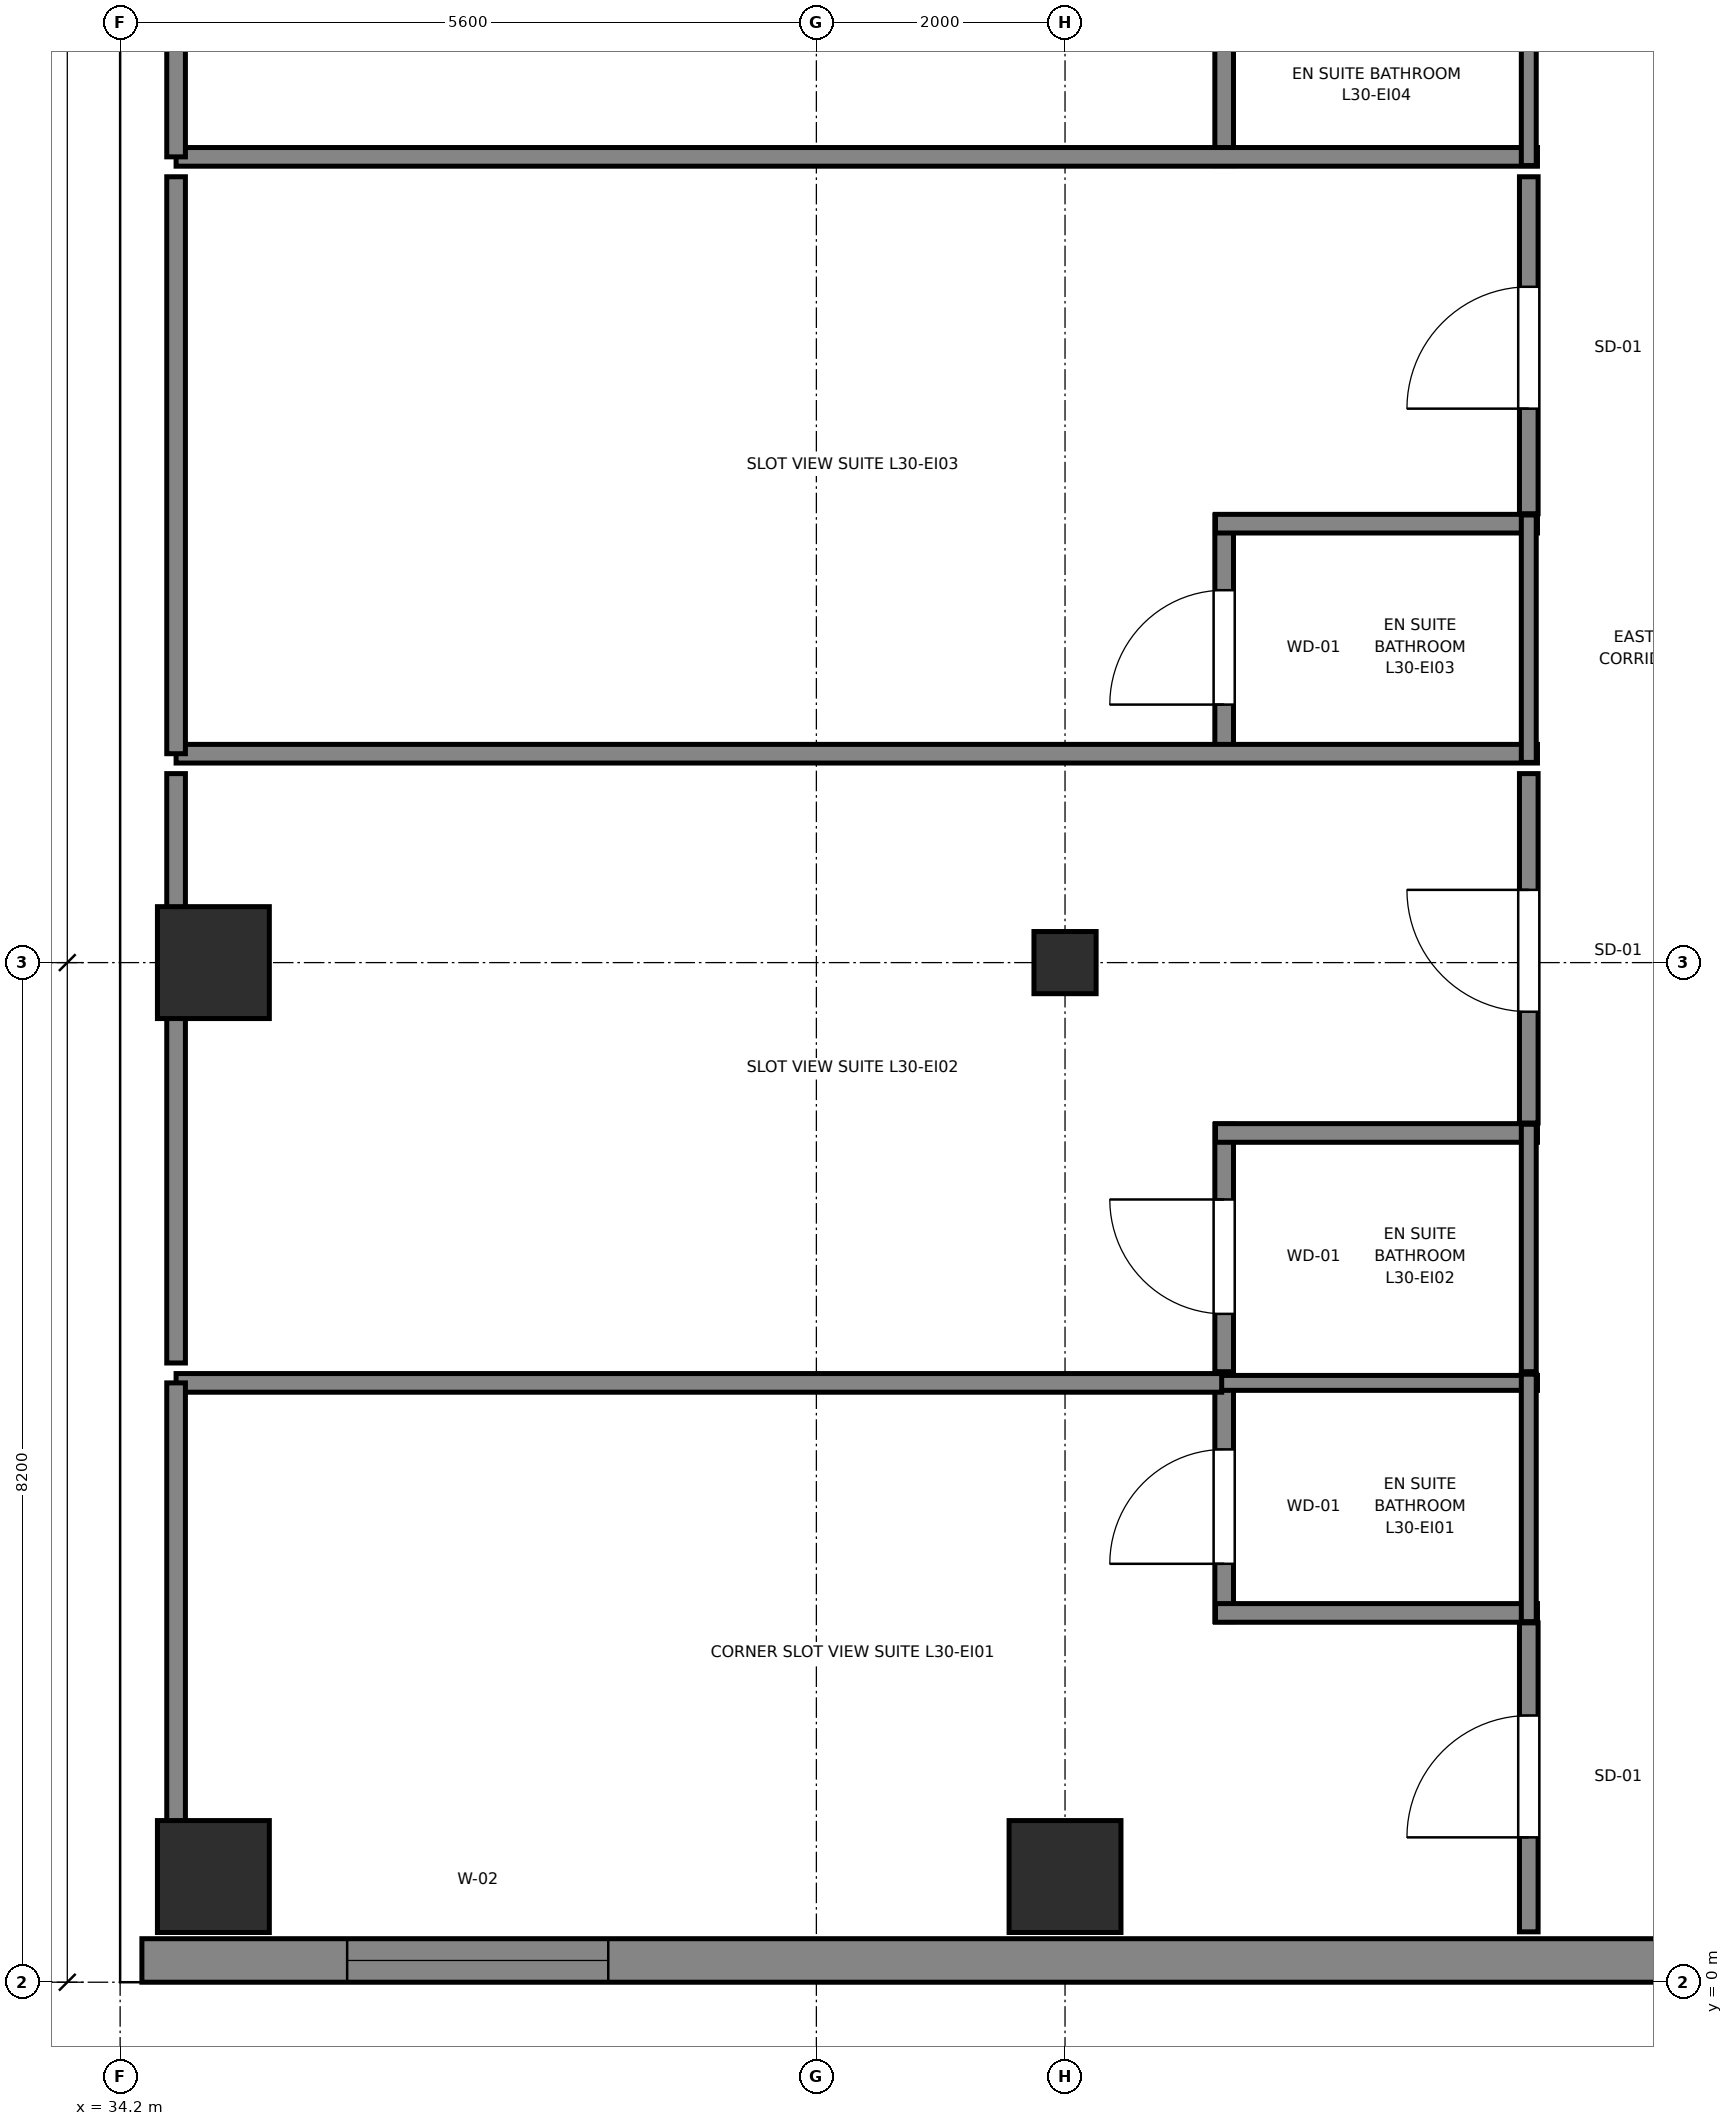
"""IFC4 building model, lengths in metres.
Left out: names, types, materials, properties, quantities, classifications, styles, units other than length and angle.
Written with IfcOpenShell. Run it as: python <this file> out.ifc"""

import sys

from ifc_helpers import new_model, si_unit, direction, frame, frame_2d, origin, origin_2d, place, context, subcontext, project, spatial, rectangle, i_section, extrude, source, transform, mapped, element, fill, save


model = new_model("IFC4")
c1 = context("Model", 3, precision=1e-05, world=origin(), true_north=direction((0.0, 1.0)))
c2 = subcontext(c1, "Body", "Model", "MODEL_VIEW")
j1 = project(units=[si_unit("LENGTHUNIT", "METRE"), si_unit("PLANEANGLEUNIT", "RADIAN")], contexts=[c1])
p1 = place(None, origin())
s1 = spatial("IfcSite", under=j1, at=p1, CompositionType="ELEMENT")
p2 = place(p1, origin())
s2 = spatial("IfcBuilding", under=s1, at=p2, CompositionType="ELEMENT")
p3 = place(p2, frame((0.0, 0.0, 118.65)))
s3 = spatial("IfcBuildingStorey", under=s2, at=p3, CompositionType="ELEMENT", Elevation=118.65)
m1 = source(origin(), c2, "Body", "SweptSolid", [
    extrude(rectangle(XDim=0.9, YDim=0.9, at=origin_2d()), origin(), (0.0, 0.0, 1.0), 3.55),
])
for number, where, z_axis, x_axis in (
    (1, (34.95, 0.85, 0.0), (0.0, 0.0, 1.0), (1.0, 0.0, 0.0)),
    (2, (34.95, 8.2, 0.0), (0.0, 0.0, 1.0), (1.0, 0.0, 0.0)),
    (3, (41.8, 0.85, 0.0), (0.0, 0.0, 1.0), (1.0, 0.0, 0.0)),
):
    element("IfcColumn", number, at=place(p3, frame(where, z_axis=z_axis, x_axis=x_axis)), inside=s3, PredefinedType="COLUMN", context=c2, shape_type="MappedRepresentation", body=[
        mapped(m1, transform((0.0, 0.0, 0.0), x_axis=(1.0, 0.0, 0.0), y_axis=(0.0, 1.0, 0.0), z_axis=(0.0, 0.0, 1.0), scale=1.0)),
    ])
m2 = source(origin(), c2, "Body", "SweptSolid", [
    extrude(i_section(OverallWidth=0.5, OverallDepth=0.5, WebThickness=0.022, FlangeThickness=0.034, at=origin_2d()), origin(), (0.0, 0.0, 1.0), 3.55),
])
p4 = place(p3, frame((41.8, 8.2, 0.0), z_axis=(0.0, 0.0, 1.0), x_axis=(1.0, 0.0, 0.0)))
e4 = element("IfcColumn", 4, at=p4, inside=s3, PredefinedType="COLUMN", context=c2, shape_type="MappedRepresentation", body=[
    mapped(m2, transform((0.0, 0.0, 0.0), x_axis=(1.0, 0.0, 0.0), y_axis=(0.0, 1.0, 0.0), z_axis=(0.0, 0.0, 1.0), scale=1.0)),
])
p5 = place(p3, frame((34.375, 0.175, 0.0), z_axis=(0.0, 0.0, 1.0), x_axis=(1.0, 0.0, 0.0)))
e5 = element("IfcWall", 5, at=p5, inside=s3, PredefinedType="SOLIDWALL", context=c2, shape_type="SweptSolid", body=[
    extrude(rectangle(XDim=18.008, YDim=0.35, at=frame_2d((9.004, 0.0))), origin(), (0.0, 0.0, 1.0), 3.37),
])
p6 = place(p5, frame((1.651, 0.0, 0.68)))
e6 = element("IfcOpeningElement", 6, at=p6, cuts=e5, PredefinedType="OPENING", context=c2, shape_type="SweptSolid", body=[
    extrude(rectangle(XDim=2.1, YDim=1.9, at=frame_2d((1.05, 0.95))), frame((0.0, 0.185, 0.0), z_axis=(0.0, -1.0, 0.0), x_axis=(1.0, 0.0, 0.0)), (0.0, 0.0, 1.0), 0.37),
])
p7 = place(p3, frame((43.08, 2.9, 0.0), z_axis=(0.0, 0.0, 1.0), x_axis=(0.0, 1.0, 0.0)))
e7 = element("IfcWall", 7, at=p7, inside=s3, PredefinedType="PARTITIONING", context=c2, shape_type="SweptSolid", body=[
    extrude(rectangle(XDim=1.99, YDim=0.15, at=frame_2d((0.995, 0.0))), origin(), (0.0, 0.0, 1.0), 3.37),
])
p8 = place(p7, frame((0.465, 0.0, 0.0)))
e8 = element("IfcOpeningElement", 8, at=p8, cuts=e7, PredefinedType="OPENING", context=c2, shape_type="SweptSolid", body=[
    extrude(rectangle(XDim=0.92, YDim=2.01, at=frame_2d((0.46, 1.005))), frame((0.0, 0.085, 0.0), z_axis=(0.0, -1.0, 0.0), x_axis=(1.0, 0.0, 0.0)), (0.0, 0.0, 1.0), 0.17),
])
p9 = place(p3, frame((43.01, 2.97, 0.0), z_axis=(0.0, 0.0, 1.0), x_axis=(1.0, 0.0, 0.0)))
e9 = element("IfcWall", 9, at=p9, inside=s3, PredefinedType="PARTITIONING", context=c2, shape_type="SweptSolid", body=[
    extrude(rectangle(XDim=2.59, YDim=0.15, at=frame_2d((1.295, 0.0))), origin(), (0.0, 0.0, 1.0), 3.37),
])
p10 = place(p3, frame((43.01, 4.82, 0.0), z_axis=(0.0, 0.0, 1.0), x_axis=(1.0, 0.0, 0.0)))
e10 = element("IfcWall", 10, at=p10, inside=s3, PredefinedType="PLUMBINGWALL", context=c2, shape_type="SweptSolid", body=[
    extrude(rectangle(XDim=2.59, YDim=0.12, at=frame_2d((1.295, 0.0))), origin(), (0.0, 0.0, 1.0), 3.37),
])
p11 = place(p3, frame((45.53, 2.9, 0.0), z_axis=(0.0, 0.0, 1.0), x_axis=(0.0, 1.0, 0.0)))
e11 = element("IfcWall", 11, at=p11, inside=s3, PredefinedType="PLUMBINGWALL", context=c2, shape_type="SweptSolid", body=[
    extrude(rectangle(XDim=1.99, YDim=0.12, at=frame_2d((0.995, 0.0))), origin(), (0.0, 0.0, 1.0), 3.37),
])
p12 = place(p3, frame((43.08, 4.91, 0.0), z_axis=(0.0, 0.0, 1.0), x_axis=(0.0, 1.0, 0.0)))
e12 = element("IfcWall", 12, at=p12, inside=s3, PredefinedType="PARTITIONING", context=c2, shape_type="SweptSolid", body=[
    extrude(rectangle(XDim=1.99, YDim=0.15, at=frame_2d((0.995, 0.0))), origin(), (0.0, 0.0, 1.0), 3.37),
])
p13 = place(p12, frame((0.465, 0.0, 0.0)))
e13 = element("IfcOpeningElement", 13, at=p13, cuts=e12, PredefinedType="OPENING", context=c2, shape_type="SweptSolid", body=[
    extrude(rectangle(XDim=0.92, YDim=2.01, at=frame_2d((0.46, 1.005))), frame((0.0, 0.085, 0.0), z_axis=(0.0, -1.0, 0.0), x_axis=(1.0, 0.0, 0.0)), (0.0, 0.0, 1.0), 0.17),
])
p14 = place(p3, frame((43.01, 6.83, 0.0), z_axis=(0.0, 0.0, 1.0), x_axis=(1.0, 0.0, 0.0)))
e14 = element("IfcWall", 14, at=p14, inside=s3, PredefinedType="PARTITIONING", context=c2, shape_type="SweptSolid", body=[
    extrude(rectangle(XDim=2.59, YDim=0.15, at=frame_2d((1.295, 0.0))), origin(), (0.0, 0.0, 1.0), 3.37),
])
p15 = place(p3, frame((45.53, 4.91, 0.0), z_axis=(0.0, 0.0, 1.0), x_axis=(0.0, 1.0, 0.0)))
e15 = element("IfcWall", 15, at=p15, inside=s3, PredefinedType="PLUMBINGWALL", context=c2, shape_type="SweptSolid", body=[
    extrude(rectangle(XDim=1.99, YDim=0.12, at=frame_2d((0.995, 0.0))), origin(), (0.0, 0.0, 1.0), 3.37),
])
p16 = place(p3, frame((43.08, 9.81, 0.0), z_axis=(0.0, 0.0, 1.0), x_axis=(0.0, 1.0, 0.0)))
e16 = element("IfcWall", 16, at=p16, inside=s3, PredefinedType="PARTITIONING", context=c2, shape_type="SweptSolid", body=[
    extrude(rectangle(XDim=1.99, YDim=0.15, at=frame_2d((0.995, 0.0))), origin(), (0.0, 0.0, 1.0), 3.37),
])
p17 = place(p16, frame((0.465, 0.0, 0.0)))
e17 = element("IfcOpeningElement", 17, at=p17, cuts=e16, PredefinedType="OPENING", context=c2, shape_type="SweptSolid", body=[
    extrude(rectangle(XDim=0.92, YDim=2.01, at=frame_2d((0.46, 1.005))), frame((0.0, 0.085, 0.0), z_axis=(0.0, -1.0, 0.0), x_axis=(1.0, 0.0, 0.0)), (0.0, 0.0, 1.0), 0.17),
])
p18 = place(p3, frame((34.65, 9.88, 0.0), z_axis=(0.0, 0.0, 1.0), x_axis=(1.0, 0.0, 0.0)))
e18 = element("IfcWall", 18, at=p18, inside=s3, PredefinedType="PARTITIONING", context=c2, shape_type="SweptSolid", body=[
    extrude(rectangle(XDim=10.95, YDim=0.15, at=frame_2d((5.475, 0.0))), origin(), (0.0, 0.0, 1.0), 3.37),
])
p19 = place(p3, frame((43.01, 11.73, 0.0), z_axis=(0.0, 0.0, 1.0), x_axis=(1.0, 0.0, 0.0)))
e19 = element("IfcWall", 19, at=p19, inside=s3, PredefinedType="PARTITIONING", context=c2, shape_type="SweptSolid", body=[
    extrude(rectangle(XDim=2.59, YDim=0.15, at=frame_2d((1.295, 0.0))), origin(), (0.0, 0.0, 1.0), 3.37),
])
p20 = place(p3, frame((45.53, 9.81, 0.0), z_axis=(0.0, 0.0, 1.0), x_axis=(0.0, 1.0, 0.0)))
e20 = element("IfcWall", 20, at=p20, inside=s3, PredefinedType="PLUMBINGWALL", context=c2, shape_type="SweptSolid", body=[
    extrude(rectangle(XDim=1.99, YDim=0.12, at=frame_2d((0.995, 0.0))), origin(), (0.0, 0.0, 1.0), 2.954),
])
p21 = place(p3, frame((43.08, 14.61, 0.0), z_axis=(0.0, 0.0, 1.0), x_axis=(0.0, 1.0, 0.0)))
e21 = element("IfcWall", 21, at=p21, inside=s3, PredefinedType="PARTITIONING", context=c2, shape_type="SweptSolid", body=[
    extrude(rectangle(XDim=1.99, YDim=0.15, at=frame_2d((0.995, 0.0))), origin(), (0.0, 0.0, 1.0), 3.37),
])
p22 = place(p3, frame((34.65, 14.68, 0.0), z_axis=(0.0, 0.0, 1.0), x_axis=(1.0, 0.0, 0.0)))
e22 = element("IfcWall", 22, at=p22, inside=s3, PredefinedType="PARTITIONING", context=c2, shape_type="SweptSolid", body=[
    extrude(rectangle(XDim=10.95, YDim=0.15, at=frame_2d((5.475, 0.0))), origin(), (0.0, 0.0, 1.0), 3.37),
])
p23 = place(p3, frame((45.53, 14.61, 0.0), z_axis=(0.0, 0.0, 1.0), x_axis=(0.0, 1.0, 0.0)))
e23 = element("IfcWall", 23, at=p23, inside=s3, PredefinedType="PLUMBINGWALL", context=c2, shape_type="SweptSolid", body=[
    extrude(rectangle(XDim=1.99, YDim=0.12, at=frame_2d((0.995, 0.0))), origin(), (0.0, 0.0, 1.0), 2.954),
])
p24 = place(p3, frame((45.53, 0.405, 0.0), z_axis=(0.0, 0.0, 1.0), x_axis=(0.0, 1.0, 0.0)))
e24 = element("IfcWall", 24, at=p24, inside=s3, PredefinedType="PARTITIONING", context=c2, shape_type="SweptSolid", body=[
    extrude(rectangle(XDim=2.485, YDim=0.15, at=frame_2d((1.242, 0.0))), origin(), (0.0, 0.0, 1.0), 3.37),
])
p25 = place(p24, frame((0.76, 0.0, 0.0)))
e25 = element("IfcOpeningElement", 25, at=p25, cuts=e24, PredefinedType="OPENING", context=c2, shape_type="SweptSolid", body=[
    extrude(rectangle(XDim=0.98, YDim=2.12, at=frame_2d((0.49, 1.06))), frame((0.0, 0.085, 0.0), z_axis=(0.0, -1.0, 0.0), x_axis=(1.0, 0.0, 0.0)), (0.0, 0.0, 1.0), 0.17),
])
p26 = place(p3, frame((34.65, 4.82, 0.0), z_axis=(0.0, 0.0, 1.0), x_axis=(1.0, 0.0, 0.0)))
e26 = element("IfcWall", 26, at=p26, inside=s3, PredefinedType="PARTITIONING", context=c2, shape_type="SweptSolid", body=[
    extrude(rectangle(XDim=8.41, YDim=0.15, at=frame_2d((4.205, 0.0))), origin(), (0.0, 0.0, 1.0), 3.37),
])
p27 = place(p3, frame((34.65, 0.405, 0.0), z_axis=(0.0, 0.0, 1.0), x_axis=(0.0, 1.0, 0.0)))
e27 = element("IfcWall", 27, at=p27, inside=s3, PredefinedType="PARTITIONING", context=c2, shape_type="SweptSolid", body=[
    extrude(rectangle(XDim=4.415, YDim=0.15, at=frame_2d((2.208, 0.0))), origin(), (0.0, 0.0, 1.0), 3.37),
])
p28 = place(p3, frame((45.53, 6.91, 0.0), z_axis=(0.0, 0.0, 1.0), x_axis=(0.0, 1.0, 0.0)))
e28 = element("IfcWall", 28, at=p28, inside=s3, PredefinedType="PARTITIONING", context=c2, shape_type="SweptSolid", body=[
    extrude(rectangle(XDim=2.81, YDim=0.15, at=frame_2d((1.405, 0.0))), origin(), (0.0, 0.0, 1.0), 2.954),
])
p29 = place(p28, frame((0.895, 0.0, 0.0)))
e29 = element("IfcOpeningElement", 29, at=p29, cuts=e28, PredefinedType="OPENING", context=c2, shape_type="SweptSolid", body=[
    extrude(rectangle(XDim=0.98, YDim=2.12, at=frame_2d((0.49, 1.06))), frame((0.0, 0.085, 0.0), z_axis=(0.0, -1.0, 0.0), x_axis=(1.0, 0.0, 0.0)), (0.0, 0.0, 1.0), 0.17),
])
p30 = place(p3, frame((34.65, 4.98, 0.0), z_axis=(0.0, 0.0, 1.0), x_axis=(0.0, 1.0, 0.0)))
e30 = element("IfcWall", 30, at=p30, inside=s3, PredefinedType="PARTITIONING", context=c2, shape_type="SweptSolid", body=[
    extrude(rectangle(XDim=4.74, YDim=0.15, at=frame_2d((2.37, 0.0))), origin(), (0.0, 0.0, 1.0), 3.37),
])
p31 = place(p3, frame((45.53, 11.81, 0.0), z_axis=(0.0, 0.0, 1.0), x_axis=(0.0, 1.0, 0.0)))
e31 = element("IfcWall", 31, at=p31, inside=s3, PredefinedType="PARTITIONING", context=c2, shape_type="SweptSolid", body=[
    extrude(rectangle(XDim=2.71, YDim=0.15, at=frame_2d((1.355, 0.0))), origin(), (0.0, 0.0, 1.0), 2.954),
])
p32 = place(p31, frame((0.845, 0.0, 0.0)))
e32 = element("IfcOpeningElement", 32, at=p32, cuts=e31, PredefinedType="OPENING", context=c2, shape_type="SweptSolid", body=[
    extrude(rectangle(XDim=0.98, YDim=2.12, at=frame_2d((0.49, 1.06))), frame((0.0, 0.085, 0.0), z_axis=(0.0, -1.0, 0.0), x_axis=(1.0, 0.0, 0.0)), (0.0, 0.0, 1.0), 0.17),
])
p33 = place(p3, frame((34.65, 9.88, 0.0), z_axis=(0.0, 0.0, 1.0), x_axis=(0.0, 1.0, 0.0)))
e33 = element("IfcWall", 33, at=p33, inside=s3, PredefinedType="PARTITIONING", context=c2, shape_type="SweptSolid", body=[
    extrude(rectangle(XDim=4.64, YDim=0.15, at=frame_2d((2.32, 0.0))), origin(), (0.0, 0.0, 1.0), 3.37),
])
p34 = place(p3, frame((34.65, 14.68, 0.0), z_axis=(0.0, 0.0, 1.0), x_axis=(0.0, 1.0, 0.0)))
e34 = element("IfcWall", 34, at=p34, inside=s3, PredefinedType="PARTITIONING", context=c2, shape_type="SweptSolid", body=[
    extrude(rectangle(XDim=4.74, YDim=0.15, at=frame_2d((2.37, 0.0))), origin(), (0.0, 0.0, 1.0), 3.37),
])
m3 = source(origin(), c2, "Body", "SweptSolid", [
    extrude(rectangle(XDim=2.1, YDim=1.9, at=frame_2d((1.05, 0.95))), frame((0.0, 0.09, 0.0), z_axis=(0.0, -1.0, 0.0), x_axis=(1.0, 0.0, 0.0)), (0.0, 0.0, 1.0), 0.06),
])
p35 = place(p6, origin())
e35 = element("IfcWindow", 35, at=p35, inside=s3, PartitioningType="TRIPLE_PANEL_HORIZONTAL", PredefinedType="WINDOW", context=c2, shape_type="MappedRepresentation", body=[
    mapped(m3, transform((0.0, 0.0, 0.0), x_axis=(1.0, 0.0, 0.0), y_axis=(0.0, 1.0, 0.0), z_axis=(0.0, 0.0, 1.0), scale=1.0)),
])
fill(e6, e35)
m4 = source(origin(), c2, "Body", "SweptSolid", [
    extrude(rectangle(XDim=0.92, YDim=2.01, at=frame_2d((0.46, 1.005))), frame((0.0, 0.025, 0.0), z_axis=(0.0, -1.0, 0.0), x_axis=(1.0, 0.0, 0.0)), (0.0, 0.0, 1.0), 0.05),
])
p36 = place(p8, origin())
e36 = element("IfcDoor", 36, at=p36, inside=s3, OperationType="SINGLE_SWING_LEFT", PredefinedType="DOOR", context=c2, shape_type="MappedRepresentation", body=[
    mapped(m4, transform((0.0, 0.0, 0.0), x_axis=(1.0, 0.0, 0.0), y_axis=(0.0, 1.0, 0.0), z_axis=(0.0, 0.0, 1.0), scale=1.0)),
])
fill(e8, e36)
p37 = place(p13, origin())
e37 = element("IfcDoor", 37, at=p37, inside=s3, OperationType="SINGLE_SWING_RIGHT", PredefinedType="DOOR", context=c2, shape_type="MappedRepresentation", body=[
    mapped(m4, transform((0.0, 0.0, 0.0), x_axis=(1.0, 0.0, 0.0), y_axis=(0.0, 1.0, 0.0), z_axis=(0.0, 0.0, 1.0), scale=1.0)),
])
fill(e13, e37)
p38 = place(p17, origin())
e38 = element("IfcDoor", 38, at=p38, inside=s3, OperationType="SINGLE_SWING_LEFT", PredefinedType="DOOR", context=c2, shape_type="MappedRepresentation", body=[
    mapped(m4, transform((0.0, 0.0, 0.0), x_axis=(1.0, 0.0, 0.0), y_axis=(0.0, 1.0, 0.0), z_axis=(0.0, 0.0, 1.0), scale=1.0)),
])
fill(e17, e38)
m5 = source(origin(), c2, "Body", "SweptSolid", [
    extrude(rectangle(XDim=0.98, YDim=2.12, at=frame_2d((0.49, 1.06))), frame((0.0, 0.025, 0.0), z_axis=(0.0, -1.0, 0.0), x_axis=(1.0, 0.0, 0.0)), (0.0, 0.0, 1.0), 0.05),
])
p39 = place(p25, origin())
e39 = element("IfcDoor", 39, at=p39, inside=s3, OperationType="SINGLE_SWING_LEFT", PredefinedType="DOOR", context=c2, shape_type="MappedRepresentation", body=[
    mapped(m5, transform((0.0, 0.0, 0.0), x_axis=(1.0, 0.0, 0.0), y_axis=(0.0, 1.0, 0.0), z_axis=(0.0, 0.0, 1.0), scale=1.0)),
])
fill(e25, e39)
p40 = place(p29, origin())
e40 = element("IfcDoor", 40, at=p40, inside=s3, OperationType="SINGLE_SWING_RIGHT", PredefinedType="DOOR", context=c2, shape_type="MappedRepresentation", body=[
    mapped(m5, transform((0.0, 0.0, 0.0), x_axis=(1.0, 0.0, 0.0), y_axis=(0.0, 1.0, 0.0), z_axis=(0.0, 0.0, 1.0), scale=1.0)),
])
fill(e29, e40)
p41 = place(p32, origin())
e41 = element("IfcDoor", 41, at=p41, inside=s3, OperationType="SINGLE_SWING_LEFT", PredefinedType="DOOR", context=c2, shape_type="MappedRepresentation", body=[
    mapped(m5, transform((0.0, 0.0, 0.0), x_axis=(1.0, 0.0, 0.0), y_axis=(0.0, 1.0, 0.0), z_axis=(0.0, 0.0, 1.0), scale=1.0)),
])
fill(e32, e41)
save(model, sys.argv[1])
